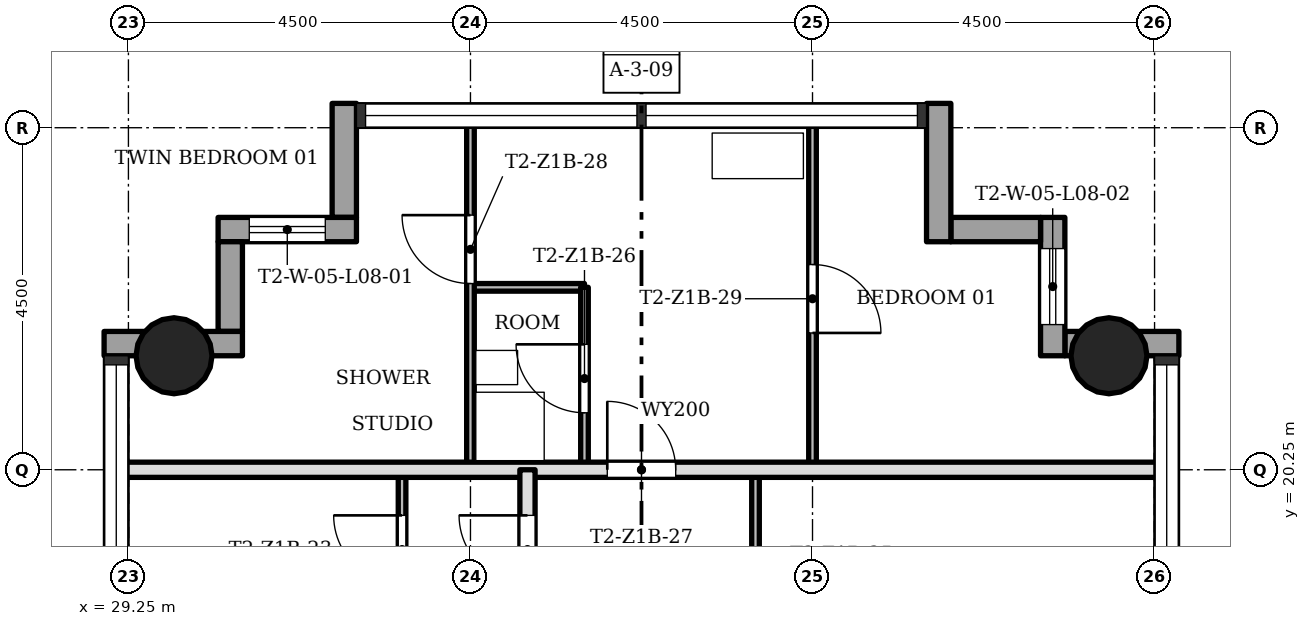
"""IFC4 building model, lengths in metres.
Left out: names, types, materials, properties, quantities, classifications, styles, units other than length and angle.
Written with IfcOpenShell. Run it as: python <this file> out.ifc"""

import sys

from ifc_helpers import new_model, si_unit, direction, frame, frame_2d, origin, origin_2d, place, context, subcontext, project, spatial, rectangle, hollow_circle, extrude, element, fill, save


model = new_model("IFC4")
c1 = context("Model", 3, precision=1e-05, world=origin(), true_north=direction((0.0, 1.0)))
c2 = subcontext(c1, "Body", "Model", "MODEL_VIEW")
j1 = project(units=[si_unit("LENGTHUNIT", "METRE"), si_unit("PLANEANGLEUNIT", "RADIAN")], contexts=[c1])
p1 = place(None, origin())
s1 = spatial("IfcSite", under=j1, at=p1, CompositionType="ELEMENT")
p2 = place(p1, origin())
s2 = spatial("IfcBuilding", under=s1, at=p2, CompositionType="ELEMENT")
p3 = place(p2, frame((0.0, 0.0, 34.7)))
s3 = spatial("IfcBuildingStorey", under=s2, at=p3, CompositionType="ELEMENT", Elevation=34.7)
for number, where, z_axis, x_axis in (
    (1, (42.15, 21.75, 0.0), (0.0, 0.0, 1.0), (1.0, 0.0, 0.0)),
    (2, (29.85, 21.75, 0.0), (0.0, 0.0, 1.0), (1.0, 0.0, 0.0)),
):
    element("IfcColumn", number, at=place(p3, frame(where, z_axis=z_axis, x_axis=x_axis)), inside=s3, PredefinedType="COLUMN", context=c2, shape_type="SweptSolid", body=[
        extrude(hollow_circle(Radius=0.5, WallThickness=0.036, at=origin_2d()), origin(), (0.0, 0.0, 1.0), 3.4),
    ])
p4 = place(p3, frame((43.07, 21.91, -0.3), z_axis=(0.0, 0.0, 1.0), x_axis=(-1.0, 0.0, 0.0)))
e3 = element("IfcWall", 3, at=p4, inside=s3, PredefinedType="STANDARD", context=c2, shape_type="SweptSolid", body=[
    extrude(rectangle(XDim=1.5, YDim=0.32, at=frame_2d((0.75, 0.0))), origin(), (0.0, 0.0, 1.0), 3.4),
])
p5 = place(p3, frame((41.41, 21.75, -0.3), z_axis=(0.0, 0.0, 1.0), x_axis=(0.0, 1.0, 0.0)))
e4 = element("IfcWall", 4, at=p5, inside=s3, PredefinedType="STANDARD", context=c2, shape_type="SweptSolid", body=[
    extrude(rectangle(XDim=1.82, YDim=0.32, at=frame_2d((0.91, 0.0))), origin(), (0.0, 0.0, 1.0), 3.4),
])
p6 = place(p5, frame((0.41, 0.0, 1.2)))
e5 = element("IfcOpeningElement", 5, at=p6, cuts=e4, PredefinedType="OPENING", context=c2, shape_type="SweptSolid", body=[
    extrude(rectangle(XDim=1.0, YDim=1.5, at=frame_2d((0.5, 0.75))), frame((0.0, 0.17, 0.0), z_axis=(0.0, -1.0, 0.0), x_axis=(1.0, 0.0, 0.0)), (0.0, 0.0, 1.0), 0.34),
])
p7 = place(p3, frame((41.25, 23.41, -0.3), z_axis=(0.0, 0.0, 1.0), x_axis=(-1.0, 0.0, 0.0)))
e6 = element("IfcWall", 6, at=p7, inside=s3, PredefinedType="STANDARD", context=c2, shape_type="SweptSolid", body=[
    extrude(rectangle(XDim=1.18, YDim=0.32, at=frame_2d((0.59, 0.0))), origin(), (0.0, 0.0, 1.0), 3.4),
])
p8 = place(p3, frame((39.91, 23.25, -0.3), z_axis=(0.0, 0.0, 1.0), x_axis=(0.0, 1.0, 0.0)))
e7 = element("IfcWall", 7, at=p8, inside=s3, PredefinedType="STANDARD", context=c2, shape_type="SweptSolid", body=[
    extrude(rectangle(XDim=1.82, YDim=0.32, at=frame_2d((0.91, 0.0))), origin(), (0.0, 0.0, 1.0), 3.4),
])
p9 = place(p3, frame((32.09, 25.07, -0.3), z_axis=(0.0, 0.0, 1.0), x_axis=(0.0, -1.0, 0.0)))
e8 = element("IfcWall", 8, at=p9, inside=s3, PredefinedType="STANDARD", context=c2, shape_type="SweptSolid", body=[
    extrude(rectangle(XDim=1.5, YDim=0.32, at=frame_2d((0.75, 0.0))), origin(), (0.0, 0.0, 1.0), 3.4),
])
p10 = place(p3, frame((32.25, 23.41, -0.3), z_axis=(0.0, 0.0, 1.0), x_axis=(-1.0, 0.0, 0.0)))
e9 = element("IfcWall", 9, at=p10, inside=s3, PredefinedType="STANDARD", context=c2, shape_type="SweptSolid", body=[
    extrude(rectangle(XDim=1.82, YDim=0.32, at=frame_2d((0.91, 0.0))), origin(), (0.0, 0.0, 1.0), 3.4),
])
p11 = place(p10, frame((0.41, 0.0, 1.2)))
e10 = element("IfcOpeningElement", 10, at=p11, cuts=e9, PredefinedType="OPENING", context=c2, shape_type="SweptSolid", body=[
    extrude(rectangle(XDim=1.0, YDim=1.5, at=frame_2d((0.5, 0.75))), frame((0.0, 0.17, 0.0), z_axis=(0.0, -1.0, 0.0), x_axis=(1.0, 0.0, 0.0)), (0.0, 0.0, 1.0), 0.34),
])
p12 = place(p3, frame((30.59, 23.25, -0.3), z_axis=(0.0, 0.0, 1.0), x_axis=(0.0, -1.0, 0.0)))
e11 = element("IfcWall", 11, at=p12, inside=s3, PredefinedType="STANDARD", context=c2, shape_type="SweptSolid", body=[
    extrude(rectangle(XDim=1.18, YDim=0.32, at=frame_2d((0.59, 0.0))), origin(), (0.0, 0.0, 1.0), 3.4),
])
p13 = place(p3, frame((30.75, 21.91, -0.3), z_axis=(0.0, 0.0, 1.0), x_axis=(-1.0, 0.0, 0.0)))
e12 = element("IfcWall", 12, at=p13, inside=s3, PredefinedType="STANDARD", context=c2, shape_type="SweptSolid", body=[
    extrude(rectangle(XDim=1.82, YDim=0.32, at=frame_2d((0.91, 0.0))), origin(), (0.0, 0.0, 1.0), 3.4),
])
p14 = place(p3, frame((42.85, 20.25, 0.0), z_axis=(0.0, 0.0, 1.0), x_axis=(-1.0, 0.0, 0.0)))
e13 = element("IfcWall", 13, at=p14, inside=s3, PredefinedType="SOLIDWALL", context=c2, shape_type="SweptSolid", body=[
    extrude(rectangle(XDim=13.7, YDim=0.2, at=frame_2d((6.85, 0.0))), origin(), (0.0, 0.0, 1.0), 3.0),
])
p15 = place(p14, frame((6.4, 0.0, 0.0)))
e14 = element("IfcOpeningElement", 14, at=p15, cuts=e13, PredefinedType="OPENING", context=c2, shape_type="SweptSolid", body=[
    extrude(rectangle(XDim=0.9, YDim=2.1, at=frame_2d((0.45, 1.05))), frame((0.0, 0.11, 0.0), z_axis=(0.0, -1.0, 0.0), x_axis=(1.0, 0.0, 0.0)), (0.0, 0.0, 1.0), 0.22),
])
p16 = place(p3, frame((35.25, 22.65, 0.0), z_axis=(0.0, 0.0, 1.0), x_axis=(-1.0, 0.0, 0.0)))
e15 = element("IfcWall", 15, at=p16, inside=s3, PredefinedType="PARTITIONING", context=c2, shape_type="SweptSolid", body=[
    extrude(rectangle(XDim=1.5, YDim=0.1, at=frame_2d((0.75, 0.0))), origin(), (0.0, 0.0, 1.0), 3.0),
])
p17 = place(p3, frame((38.25, 20.25, 0.0), z_axis=(0.0, 0.0, 1.0), x_axis=(0.0, 1.0, 0.0)))
e16 = element("IfcWall", 16, at=p17, inside=s3, PredefinedType="PARTITIONING", context=c2, shape_type="SweptSolid", body=[
    extrude(rectangle(XDim=4.6, YDim=0.1, at=frame_2d((2.3, 0.0))), origin(), (0.0, 0.0, 1.0), 3.0),
])
p18 = place(p17, frame((1.8, 0.0, 0.0)))
e17 = element("IfcOpeningElement", 17, at=p18, cuts=e16, PredefinedType="OPENING", context=c2, shape_type="SweptSolid", body=[
    extrude(rectangle(XDim=0.9, YDim=2.1, at=frame_2d((0.45, 1.05))), frame((0.0, 0.06, 0.0), z_axis=(0.0, -1.0, 0.0), x_axis=(1.0, 0.0, 0.0)), (0.0, 0.0, 1.0), 0.12),
])
p19 = place(p3, frame((37.5, 15.75, 0.0), z_axis=(0.0, 0.0, 1.0), x_axis=(0.0, 1.0, 0.0)))
e18 = element("IfcWall", 18, at=p19, inside=s3, PredefinedType="PARTITIONING", context=c2, shape_type="SweptSolid", body=[
    extrude(rectangle(XDim=4.5, YDim=0.1, at=frame_2d((2.25, 0.0))), origin(), (0.0, 0.0, 1.0), 3.0),
])
p20 = place(p19, frame((1.8, 0.0, 0.0)))
e19 = element("IfcOpeningElement", 19, at=p20, cuts=e18, PredefinedType="OPENING", context=c2, shape_type="SweptSolid", body=[
    extrude(rectangle(XDim=0.9, YDim=2.1, at=frame_2d((0.45, 1.05))), frame((0.0, 0.06, 0.0), z_axis=(0.0, -1.0, 0.0), x_axis=(1.0, 0.0, 0.0)), (0.0, 0.0, 1.0), 0.12),
])
p21 = place(p3, frame((35.25, 20.25, 0.0), z_axis=(0.0, 0.0, 1.0), x_axis=(0.0, 1.0, 0.0)))
e20 = element("IfcWall", 20, at=p21, inside=s3, PredefinedType="PARTITIONING", context=c2, shape_type="SweptSolid", body=[
    extrude(rectangle(XDim=2.4, YDim=0.1, at=frame_2d((1.2, 0.0))), origin(), (0.0, 0.0, 1.0), 3.0),
])
p22 = place(p21, frame((0.75, 0.0, 0.0)))
e21 = element("IfcOpeningElement", 21, at=p22, cuts=e20, PredefinedType="OPENING", context=c2, shape_type="SweptSolid", body=[
    extrude(rectangle(XDim=0.9, YDim=2.1, at=frame_2d((0.45, 1.05))), frame((0.0, 0.06, 0.0), z_axis=(0.0, -1.0, 0.0), x_axis=(1.0, 0.0, 0.0)), (0.0, 0.0, 1.0), 0.12),
])
p23 = place(p3, frame((34.5, 15.75, 0.0), z_axis=(0.0, 0.0, 1.0), x_axis=(0.0, 1.0, 0.0)))
e22 = element("IfcWall", 22, at=p23, inside=s3, PredefinedType="SOLIDWALL", context=c2, shape_type="SweptSolid", body=[
    extrude(rectangle(XDim=4.5, YDim=0.2, at=frame_2d((2.25, 0.0))), origin(), (0.0, 0.0, 1.0), 3.0),
])
p24 = place(p23, frame((3.0, 0.0, 0.0)))
e23 = element("IfcOpeningElement", 23, at=p24, cuts=e22, PredefinedType="OPENING", context=c2, shape_type="SweptSolid", body=[
    extrude(rectangle(XDim=0.9, YDim=2.1, at=frame_2d((0.45, 1.05))), frame((0.0, 0.11, 0.0), z_axis=(0.0, -1.0, 0.0), x_axis=(1.0, 0.0, 0.0)), (0.0, 0.0, 1.0), 0.22),
])
p25 = place(p3, frame((33.75, 20.25, 0.0), z_axis=(0.0, 0.0, 1.0), x_axis=(0.0, 1.0, 0.0)))
e24 = element("IfcWall", 24, at=p25, inside=s3, PredefinedType="PARTITIONING", context=c2, shape_type="SweptSolid", body=[
    extrude(rectangle(XDim=4.6, YDim=0.1, at=frame_2d((2.3, 0.0))), origin(), (0.0, 0.0, 1.0), 3.0),
])
p26 = place(p25, frame((2.45, 0.0, 0.0)))
e25 = element("IfcOpeningElement", 25, at=p26, cuts=e24, PredefinedType="OPENING", context=c2, shape_type="SweptSolid", body=[
    extrude(rectangle(XDim=0.9, YDim=2.1, at=frame_2d((0.45, 1.05))), frame((0.0, 0.06, 0.0), z_axis=(0.0, -1.0, 0.0), x_axis=(1.0, 0.0, 0.0)), (0.0, 0.0, 1.0), 0.12),
])
p27 = place(p3, frame((32.85, 15.75, 0.0), z_axis=(0.0, 0.0, 1.0), x_axis=(0.0, 1.0, 0.0)))
e26 = element("IfcWall", 26, at=p27, inside=s3, PredefinedType="PARTITIONING", context=c2, shape_type="SweptSolid", body=[
    extrude(rectangle(XDim=4.5, YDim=0.1, at=frame_2d((2.25, 0.0))), origin(), (0.0, 0.0, 1.0), 3.0),
])
p28 = place(p27, frame((3.0, 0.0, 0.0)))
e27 = element("IfcOpeningElement", 27, at=p28, cuts=e26, PredefinedType="OPENING", context=c2, shape_type="SweptSolid", body=[
    extrude(rectangle(XDim=0.9, YDim=2.1, at=frame_2d((0.45, 1.05))), frame((0.0, 0.06, 0.0), z_axis=(0.0, -1.0, 0.0), x_axis=(1.0, 0.0, 0.0)), (0.0, 0.0, 1.0), 0.12),
])
p29 = place(p24, origin())
e28 = element("IfcDoor", 28, at=p29, inside=s3, OperationType="SINGLE_SWING_LEFT", PredefinedType="DOOR", context=c2, shape_type="SweptSolid", body=[
    extrude(rectangle(XDim=0.9, YDim=2.1, at=frame_2d((0.45, 1.05))), frame((0.0, 0.025, 0.0), z_axis=(0.0, -1.0, 0.0), x_axis=(1.0, 0.0, 0.0)), (0.0, 0.0, 1.0), 0.05),
])
fill(e23, e28)
p30 = place(p28, origin())
e29 = element("IfcDoor", 29, at=p30, inside=s3, OperationType="SINGLE_SWING_LEFT", PredefinedType="DOOR", context=c2, shape_type="SweptSolid", body=[
    extrude(rectangle(XDim=0.9, YDim=2.1, at=frame_2d((0.45, 1.05))), frame((0.0, 0.025, 0.0), z_axis=(0.0, -1.0, 0.0), x_axis=(1.0, 0.0, 0.0)), (0.0, 0.0, 1.0), 0.05),
])
fill(e27, e29)
p31 = place(p22, origin())
e30 = element("IfcDoor", 30, at=p31, inside=s3, OperationType="SINGLE_SWING_LEFT", PredefinedType="DOOR", context=c2, shape_type="SweptSolid", body=[
    extrude(rectangle(XDim=0.9, YDim=2.1, at=frame_2d((0.45, 1.05))), frame((0.0, 0.025, 0.0), z_axis=(0.0, -1.0, 0.0), x_axis=(1.0, 0.0, 0.0)), (0.0, 0.0, 1.0), 0.05),
])
fill(e21, e30)
p32 = place(p15, origin())
e31 = element("IfcDoor", 31, at=p32, inside=s3, OperationType="SINGLE_SWING_RIGHT", PredefinedType="DOOR", context=c2, shape_type="SweptSolid", body=[
    extrude(rectangle(XDim=0.9, YDim=2.1, at=frame_2d((0.45, 1.05))), frame((0.0, 0.025, 0.0), z_axis=(0.0, -1.0, 0.0), x_axis=(1.0, 0.0, 0.0)), (0.0, 0.0, 1.0), 0.05),
])
fill(e14, e31)
p33 = place(p26, origin())
e32 = element("IfcDoor", 32, at=p33, inside=s3, OperationType="SINGLE_SWING_LEFT", PredefinedType="DOOR", context=c2, shape_type="SweptSolid", body=[
    extrude(rectangle(XDim=0.9, YDim=2.1, at=frame_2d((0.45, 1.05))), frame((0.0, 0.025, 0.0), z_axis=(0.0, -1.0, 0.0), x_axis=(1.0, 0.0, 0.0)), (0.0, 0.0, 1.0), 0.05),
])
fill(e25, e32)
p34 = place(p18, origin())
e33 = element("IfcDoor", 33, at=p34, inside=s3, OperationType="SINGLE_SWING_LEFT", PredefinedType="DOOR", context=c2, shape_type="SweptSolid", body=[
    extrude(rectangle(XDim=0.9, YDim=2.1, at=frame_2d((0.45, 1.05))), frame((0.0, 0.025, 0.0), z_axis=(0.0, -1.0, 0.0), x_axis=(1.0, 0.0, 0.0)), (0.0, 0.0, 1.0), 0.05),
])
fill(e17, e33)
p35 = place(p11, origin())
e34 = element("IfcWindow", 34, at=p35, inside=s3, PartitioningType="SINGLE_PANEL", PredefinedType="WINDOW", context=c2, shape_type="SweptSolid", body=[
    extrude(rectangle(XDim=1.0, YDim=1.5, at=frame_2d((0.5, 0.75))), frame((0.0, 0.03, 0.0), z_axis=(0.0, -1.0, 0.0), x_axis=(1.0, 0.0, 0.0)), (0.0, 0.0, 1.0), 0.06),
])
fill(e10, e34)
p36 = place(p6, origin())
e35 = element("IfcWindow", 35, at=p36, inside=s3, PartitioningType="SINGLE_PANEL", PredefinedType="WINDOW", context=c2, shape_type="SweptSolid", body=[
    extrude(rectangle(XDim=1.0, YDim=1.5, at=frame_2d((0.5, 0.75))), frame((0.0, 0.03, 0.0), z_axis=(0.0, -1.0, 0.0), x_axis=(1.0, 0.0, 0.0)), (0.0, 0.0, 1.0), 0.06),
])
fill(e5, e35)
save(model, sys.argv[1])
